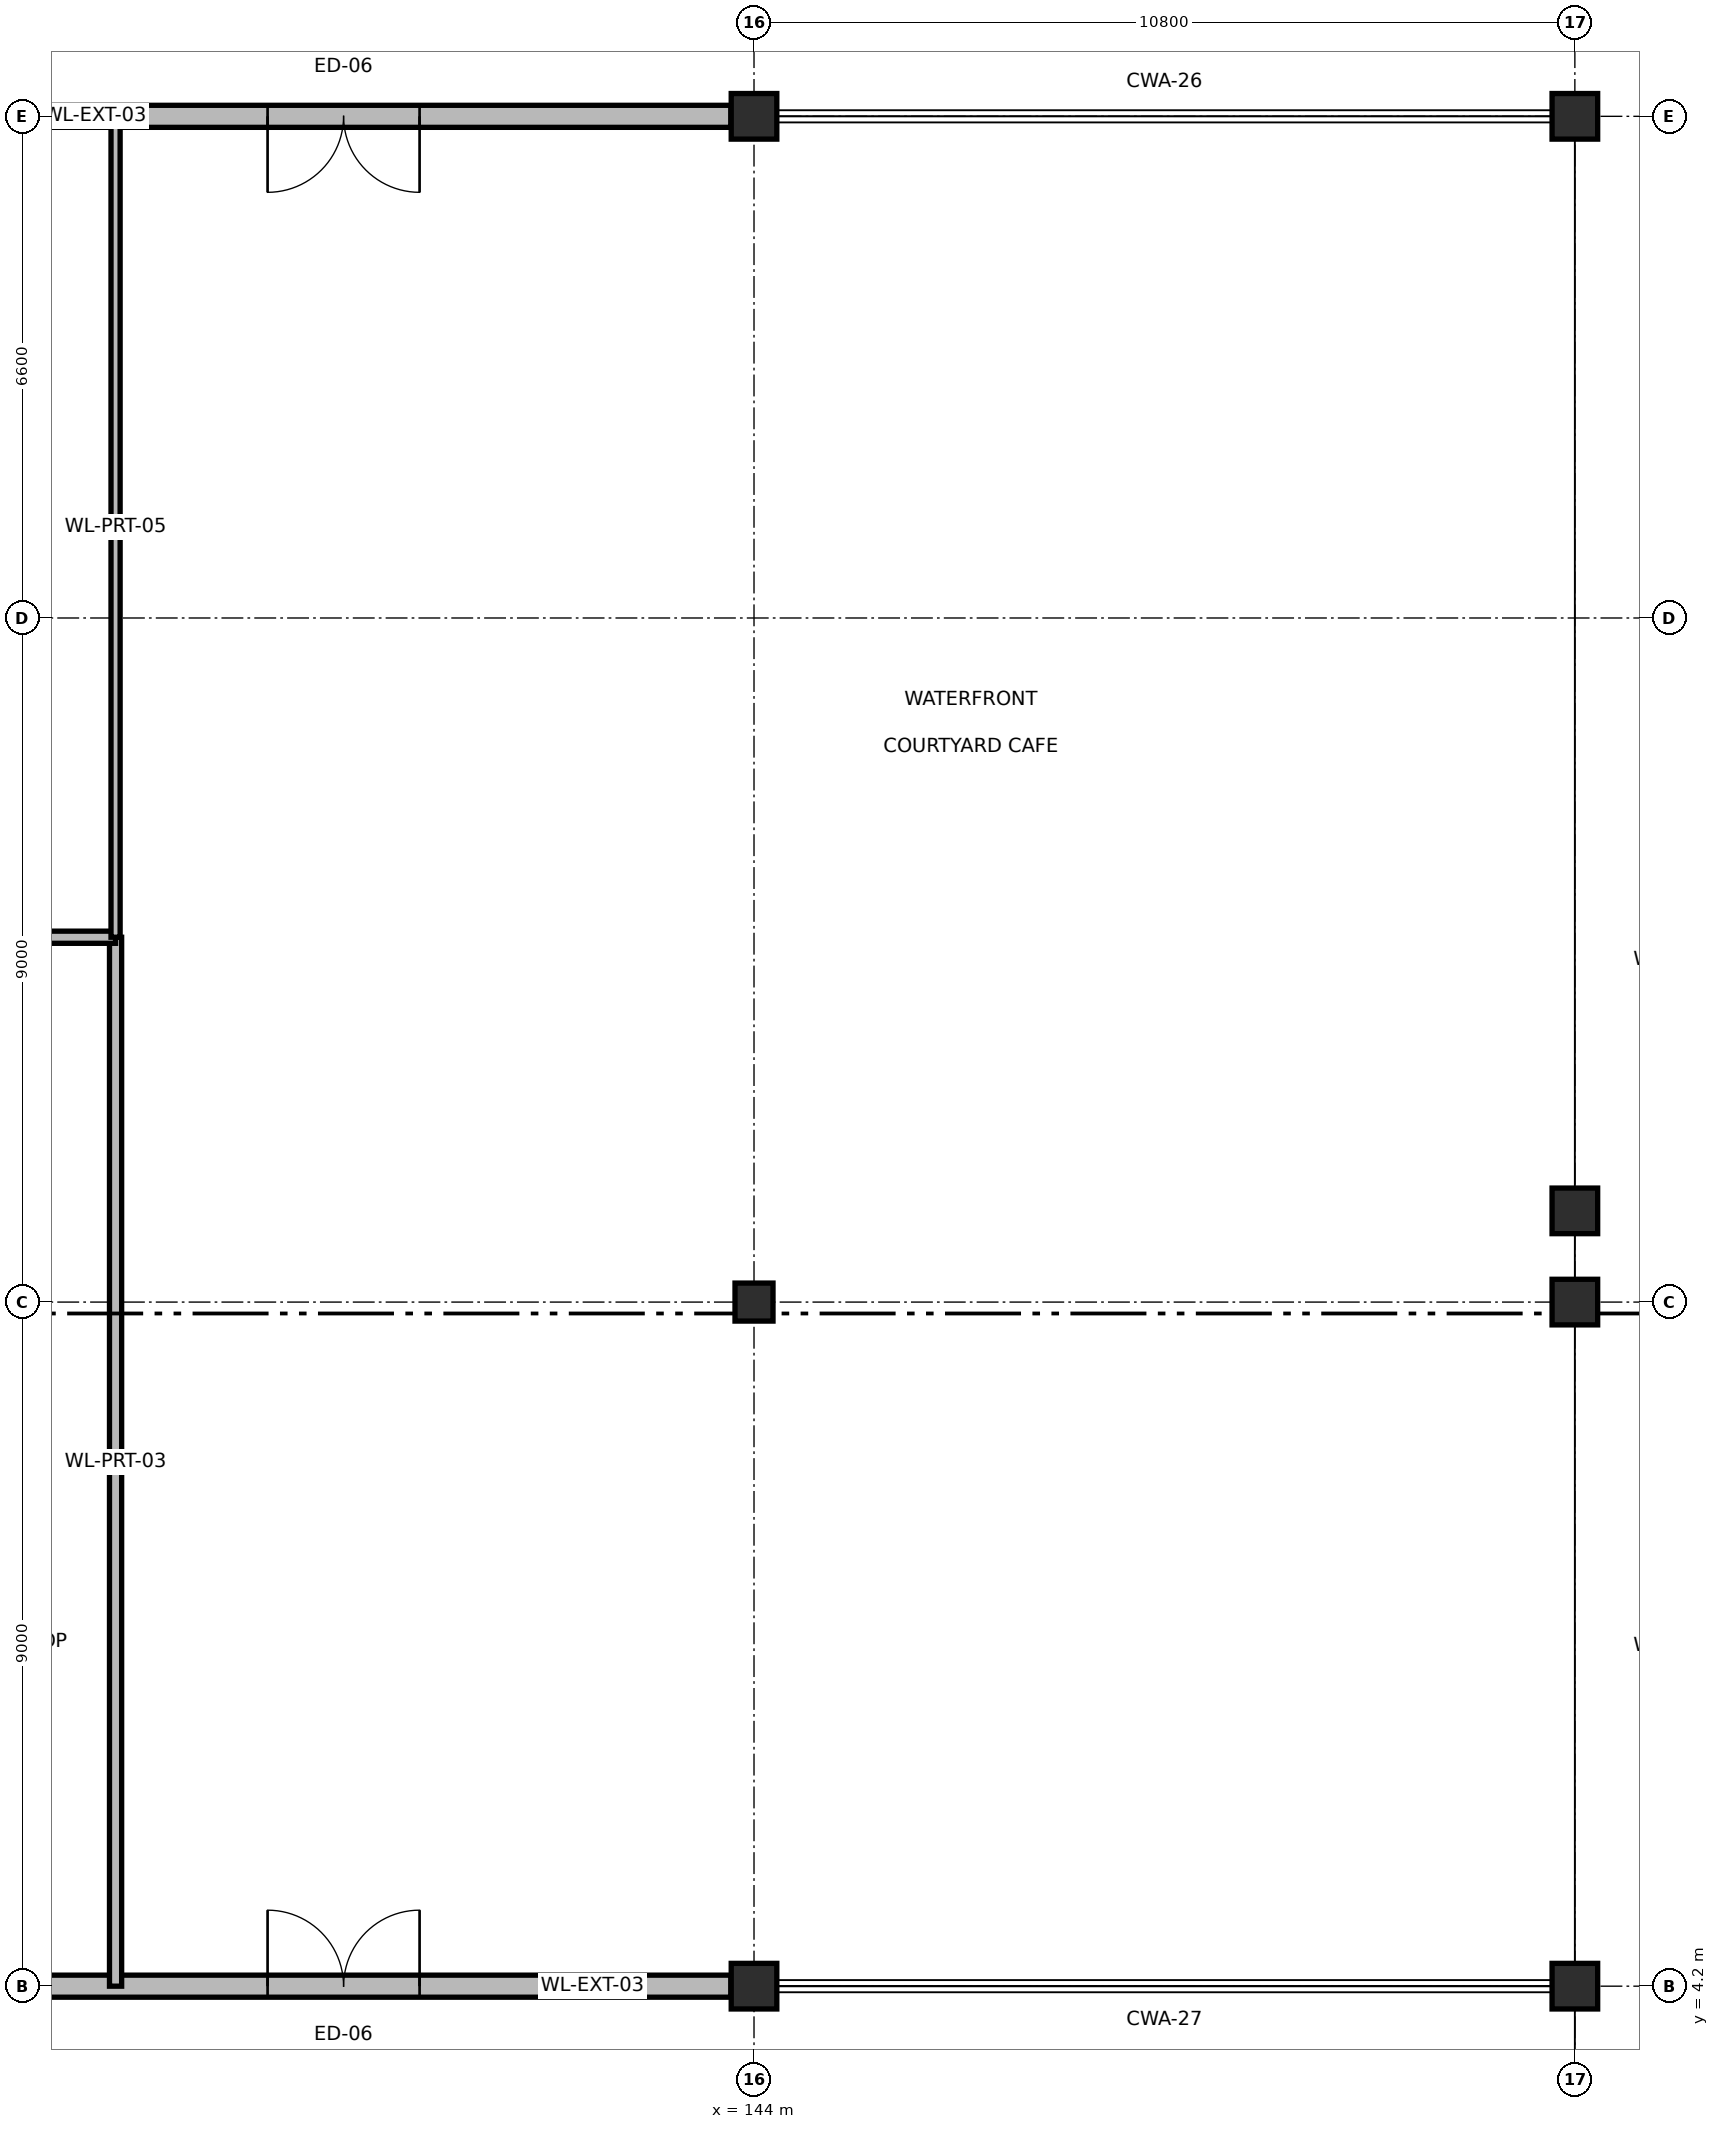
"""IFC4 building model, lengths in metres.
Left out: names, types, materials, properties, quantities, classifications, styles, units other than length and angle.
Written with IfcOpenShell. Run it as: python <this file> out.ifc"""

import sys

from ifc_helpers import new_model, si_unit, direction, frame, frame_2d, origin, origin_2d, place, context, subcontext, project, spatial, rectangle, circle, extrude, element, fill, save


model = new_model("IFC4")
c1 = context("Model", 3, precision=1e-05, world=origin(), true_north=direction((0.0, 1.0)))
c2 = subcontext(c1, "Body", "Model", "MODEL_VIEW")
j1 = project(units=[si_unit("LENGTHUNIT", "METRE"), si_unit("PLANEANGLEUNIT", "RADIAN")], contexts=[c1])
p1 = place(None, origin())
s1 = spatial("IfcSite", under=j1, at=p1, CompositionType="ELEMENT")
p2 = place(p1, origin())
s2 = spatial("IfcBuilding", under=s1, at=p2, CompositionType="ELEMENT")
p3 = place(p2, origin())
s3 = spatial("IfcBuildingStorey", under=s2, at=p3, CompositionType="ELEMENT", Elevation=0.0)
for number, where, z_axis, x_axis in (
    (1, (154.8, 13.2, 0.0), (0.0, 0.0, 1.0), (1.0, 0.0, 0.0)),
    (2, (154.8, 14.4, 0.0), (0.0, 0.0, 1.0), (1.0, 0.0, 0.0)),
):
    element("IfcColumn", number, at=place(p3, frame(where, z_axis=z_axis, x_axis=x_axis)), inside=s3, PredefinedType="COLUMN", context=c2, shape_type="SweptSolid", body=[
        extrude(rectangle(XDim=0.6, YDim=0.6, at=origin_2d()), origin(), (0.0, 0.0, 1.0), 4.8),
    ])
p4 = place(p3, frame((144.0, 4.2, 0.0), z_axis=(0.0, 0.0, 1.0), x_axis=(1.0, 0.0, 0.0)))
e3 = element("IfcColumn", 3, at=p4, inside=s3, PredefinedType="COLUMN", context=c2, shape_type="SweptSolid", body=[
    extrude(circle(Radius=0.3, at=origin_2d()), origin(), (0.0, 0.0, 1.0), 4.8),
])
p5 = place(p3, frame((144.0, 13.2, 0.0), z_axis=(0.0, 0.0, 1.0), x_axis=(1.0, 0.0, 0.0)))
e4 = element("IfcColumn", 4, at=p5, inside=s3, PredefinedType="COLUMN", context=c2, shape_type="SweptSolid", body=[
    extrude(rectangle(XDim=0.5, YDim=0.5, at=origin_2d()), origin(), (0.0, 0.0, 1.0), 4.8),
])
for number, where, z_axis, x_axis in (
    (5, (144.0, 28.8, 0.0), (0.0, 0.0, 1.0), (1.0, 0.0, 0.0)),
    (6, (154.8, 4.2, 0.0), (0.0, 0.0, 1.0), (1.0, 0.0, 0.0)),
    (7, (154.8, 28.8, 0.0), (0.0, 0.0, 1.0), (1.0, 0.0, 0.0)),
):
    element("IfcColumn", number, at=place(p3, frame(where, z_axis=z_axis, x_axis=x_axis)), inside=s3, PredefinedType="COLUMN", context=c2, shape_type="SweptSolid", body=[
        extrude(circle(Radius=0.3, at=origin_2d()), origin(), (0.0, 0.0, 1.0), 4.8),
    ])
p6 = place(p3, frame((143.695, 4.2, 0.0), z_axis=(0.0, 0.0, 1.0), x_axis=(-1.0, 0.0, 0.0)))
e8 = element("IfcWall", 8, at=p6, inside=s3, PredefinedType="SOLIDWALL", context=c2, shape_type="SweptSolid", body=[
    extrude(rectangle(XDim=10.19, YDim=0.29, at=frame_2d((5.095, 0.0))), origin(), (0.0, 0.0, 1.0), 3.85),
])
p7 = place(p6, frame((4.095, 0.0, 0.0)))
e9 = element("IfcOpeningElement", 9, at=p7, cuts=e8, PredefinedType="OPENING", context=c2, shape_type="SweptSolid", body=[
    extrude(rectangle(XDim=2.0, YDim=2.4, at=frame_2d((1.0, 1.2))), frame((0.0, 0.155, 0.0), z_axis=(0.0, -1.0, 0.0), x_axis=(1.0, 0.0, 0.0)), (0.0, 0.0, 1.0), 0.31),
])
p8 = place(p3, frame((133.505, 28.8, 0.0), z_axis=(0.0, 0.0, 1.0), x_axis=(1.0, 0.0, 0.0)))
e10 = element("IfcWall", 10, at=p8, inside=s3, PredefinedType="SOLIDWALL", context=c2, shape_type="SweptSolid", body=[
    extrude(rectangle(XDim=10.19, YDim=0.29, at=frame_2d((5.095, 0.0))), origin(), (0.0, 0.0, 1.0), 3.85),
])
p9 = place(p8, frame((4.095, 0.0, 0.0)))
e11 = element("IfcOpeningElement", 11, at=p9, cuts=e10, PredefinedType="OPENING", context=c2, shape_type="SweptSolid", body=[
    extrude(rectangle(XDim=2.0, YDim=2.4, at=frame_2d((1.0, 1.2))), frame((0.0, 0.155, 0.0), z_axis=(0.0, -1.0, 0.0), x_axis=(1.0, 0.0, 0.0)), (0.0, 0.0, 1.0), 0.31),
])
p10 = place(p3, frame((135.6, 4.2, 0.0), z_axis=(0.0, 0.0, 1.0), x_axis=(0.0, 1.0, 0.0)))
e12 = element("IfcWall", 12, at=p10, inside=s3, PredefinedType="PARTITIONING", context=c2, shape_type="SweptSolid", body=[
    extrude(rectangle(XDim=13.8, YDim=0.16, at=frame_2d((6.9, 0.0))), origin(), (0.0, 0.0, 1.0), 3.635),
])
p11 = place(p3, frame((122.4, 18.0, 0.0), z_axis=(0.0, 0.0, 1.0), x_axis=(1.0, 0.0, 0.0)))
e13 = element("IfcWall", 13, at=p11, inside=s3, PredefinedType="PARTITIONING", context=c2, shape_type="SweptSolid", body=[
    extrude(rectangle(XDim=13.2, YDim=0.16, at=frame_2d((6.6, 0.0))), origin(), (0.0, 0.0, 1.0), 3.785),
])
p12 = place(p3, frame((135.6, 18.0, 0.0), z_axis=(0.0, 0.0, 1.0), x_axis=(0.0, 1.0, 0.0)))
e14 = element("IfcWall", 14, at=p12, inside=s3, PredefinedType="PARTITIONING", context=c2, shape_type="SweptSolid", body=[
    extrude(rectangle(XDim=10.8, YDim=0.12, at=frame_2d((5.4, 0.0))), origin(), (0.0, 0.0, 1.0), 4.085),
])
p13 = place(p7, origin())
e15 = element("IfcDoor", 15, at=p13, inside=s3, OperationType="DOUBLE_DOOR_SINGLE_SWING", PredefinedType="DOOR", context=c2, shape_type="SweptSolid", body=[
    extrude(rectangle(XDim=2.0, YDim=2.4, at=frame_2d((1.0, 1.2))), frame((0.0, 0.025, 0.0), z_axis=(0.0, -1.0, 0.0), x_axis=(1.0, 0.0, 0.0)), (0.0, 0.0, 1.0), 0.05),
])
fill(e9, e15)
p14 = place(p9, origin())
e16 = element("IfcDoor", 16, at=p14, inside=s3, OperationType="DOUBLE_DOOR_SINGLE_SWING", PredefinedType="DOOR", context=c2, shape_type="SweptSolid", body=[
    extrude(rectangle(XDim=2.0, YDim=2.4, at=frame_2d((1.0, 1.2))), frame((0.0, 0.025, 0.0), z_axis=(0.0, -1.0, 0.0), x_axis=(1.0, 0.0, 0.0)), (0.0, 0.0, 1.0), 0.05),
])
fill(e11, e16)
save(model, sys.argv[1])
